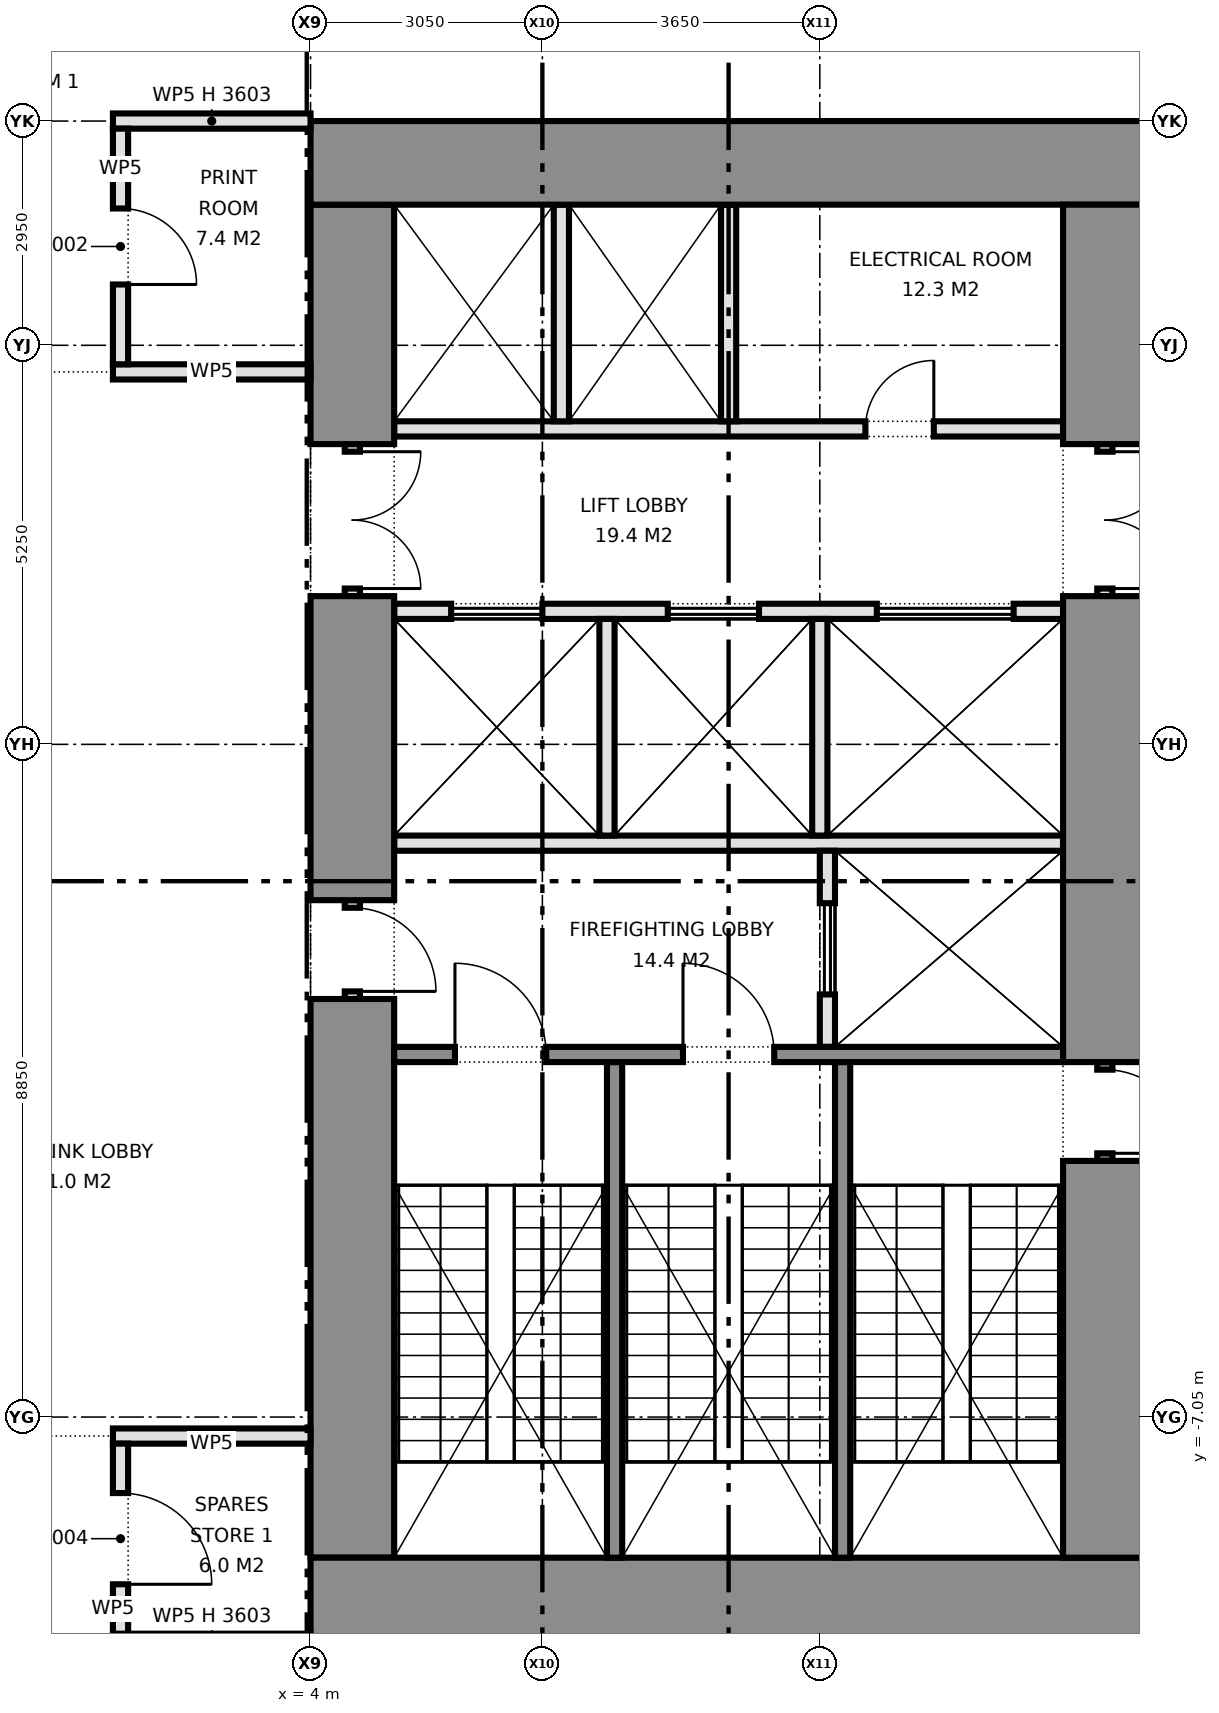
"""IFC4 building model, lengths in metres.
Left out: names, types, materials, properties, quantities, classifications, styles, units other than length and angle.
Written with IfcOpenShell. Run it as: python <this file> out.ifc"""

import sys

from ifc_helpers import new_model, si_unit, direction, frame, frame_2d, origin, place, context, subcontext, project, spatial, rectangle, extrude, element, fill, save


model = new_model("IFC4")
c1 = context("Model", 3, precision=1e-05, world=origin(), true_north=direction((0.0, 1.0)))
c2 = subcontext(c1, "Body", "Model", "MODEL_VIEW")
j1 = project(units=[si_unit("LENGTHUNIT", "METRE"), si_unit("PLANEANGLEUNIT", "RADIAN")], contexts=[c1])
p1 = place(None, origin())
s1 = spatial("IfcSite", under=j1, at=p1, CompositionType="ELEMENT")
p2 = place(p1, origin())
s2 = spatial("IfcBuilding", under=s1, at=p2, CompositionType="ELEMENT")
p3 = place(p2, frame((0.0, 0.0, 59.3)))
s3 = spatial("IfcBuildingStorey", under=s2, at=p3, CompositionType="ELEMENT", Elevation=59.3)
for number, where, z_axis, x_axis in (
    (1, (15.0, 9.45, 0.0), (0.0, 0.0, 1.0), (-1.0, 0.0, 0.0)),
    (2, (15.0, -9.45, 0.0), (0.0, 0.0, 1.0), (-1.0, 0.0, 0.0)),
):
    element("IfcWall", number, at=place(p3, frame(where, z_axis=z_axis, x_axis=x_axis)), inside=s3, PredefinedType="SHEAR", context=c2, shape_type="SweptSolid", body=[
        extrude(rectangle(XDim=11.0, YDim=1.1, at=frame_2d((5.5, 0.0))), origin(), (0.0, 0.0, 1.0), 4.55),
    ])
p4 = place(p3, frame((14.45, 8.9, 0.0), z_axis=(0.0, 0.0, 1.0), x_axis=(0.0, -1.0, 0.0)))
e3 = element("IfcWall", 3, at=p4, inside=s3, PredefinedType="SHEAR", context=c2, shape_type="SweptSolid", body=[
    extrude(rectangle(XDim=3.15, YDim=1.1, at=frame_2d((1.575, 0.0))), origin(), (0.0, 0.0, 1.0), 4.55),
])
p5 = place(p3, frame((14.45, 5.75, 0.0), z_axis=(0.0, 0.0, 1.0), x_axis=(0.0, -1.0, 0.0)))
e4 = element("IfcWall", 4, at=p5, inside=s3, PredefinedType="PARTITIONING", context=c2, shape_type="SweptSolid", body=[
    extrude(rectangle(XDim=2.0, YDim=0.2, at=frame_2d((1.0, 0.0))), origin(), (0.0, 0.0, 1.0), 2.4),
])
p6 = place(p5, frame((0.1, 0.0, 0.0)))
e5 = element("IfcOpeningElement", 5, at=p6, cuts=e4, PredefinedType="OPENING", context=c2, shape_type="SweptSolid", body=[
    extrude(rectangle(XDim=1.8, YDim=2.1, at=frame_2d((0.9, 1.05))), frame((0.0, 0.11, 0.0), z_axis=(0.0, -1.0, 0.0), x_axis=(1.0, 0.0, 0.0)), (0.0, 0.0, 1.0), 0.22),
])
p7 = place(p3, frame((14.45, 3.75, 0.0), z_axis=(0.0, 0.0, 1.0), x_axis=(0.0, -1.0, 0.0)))
e6 = element("IfcWall", 6, at=p7, inside=s3, PredefinedType="SHEAR", context=c2, shape_type="SweptSolid", body=[
    extrude(rectangle(XDim=6.13, YDim=1.1, at=frame_2d((3.065, 0.0))), origin(), (0.0, 0.0, 1.0), 4.55),
])
p8 = place(p3, frame((14.45, -2.38, 0.0), z_axis=(0.0, 0.0, 1.0), x_axis=(0.0, -1.0, 0.0)))
e7 = element("IfcWall", 7, at=p8, inside=s3, PredefinedType="SHEAR", context=c2, shape_type="SweptSolid", body=[
    extrude(rectangle(XDim=1.3, YDim=0.2, at=frame_2d((0.65, 0.0))), origin(), (0.0, 0.0, 1.0), 2.4),
])
p9 = place(p8, frame((0.1, 0.0, 0.0)))
e8 = element("IfcOpeningElement", 8, at=p9, cuts=e7, PredefinedType="OPENING", context=c2, shape_type="SweptSolid", body=[
    extrude(rectangle(XDim=1.1, YDim=2.1, at=frame_2d((0.55, 1.05))), frame((0.0, 0.11, 0.0), z_axis=(0.0, -1.0, 0.0), x_axis=(1.0, 0.0, 0.0)), (0.0, 0.0, 1.0), 0.22),
])
p10 = place(p3, frame((14.45, -3.68, 0.0), z_axis=(0.0, 0.0, 1.0), x_axis=(0.0, -1.0, 0.0)))
e9 = element("IfcWall", 9, at=p10, inside=s3, PredefinedType="SHEAR", context=c2, shape_type="SweptSolid", body=[
    extrude(rectangle(XDim=5.22, YDim=1.1, at=frame_2d((2.61, 0.0))), origin(), (0.0, 0.0, 1.0), 4.55),
])
p11 = place(p3, frame((4.55, 8.9, 0.0), z_axis=(0.0, 0.0, 1.0), x_axis=(0.0, -1.0, 0.0)))
e10 = element("IfcWall", 10, at=p11, inside=s3, PredefinedType="SHEAR", context=c2, shape_type="SweptSolid", body=[
    extrude(rectangle(XDim=3.15, YDim=1.1, at=frame_2d((1.575, 0.0))), origin(), (0.0, 0.0, 1.0), 4.55),
])
p12 = place(p3, frame((4.55, 5.75, 0.0), z_axis=(0.0, 0.0, 1.0), x_axis=(0.0, -1.0, 0.0)))
e11 = element("IfcWall", 11, at=p12, inside=s3, PredefinedType="PARTITIONING", context=c2, shape_type="SweptSolid", body=[
    extrude(rectangle(XDim=2.0, YDim=0.2, at=frame_2d((1.0, 0.0))), origin(), (0.0, 0.0, 1.0), 2.4),
])
p13 = place(p12, frame((0.1, 0.0, 0.0)))
e12 = element("IfcOpeningElement", 12, at=p13, cuts=e11, PredefinedType="OPENING", context=c2, shape_type="SweptSolid", body=[
    extrude(rectangle(XDim=1.8, YDim=2.1, at=frame_2d((0.9, 1.05))), frame((0.0, 0.11, 0.0), z_axis=(0.0, -1.0, 0.0), x_axis=(1.0, 0.0, 0.0)), (0.0, 0.0, 1.0), 0.22),
])
p14 = place(p3, frame((4.55, 3.75, 0.0), z_axis=(0.0, 0.0, 1.0), x_axis=(0.0, -1.0, 0.0)))
e13 = element("IfcWall", 13, at=p14, inside=s3, PredefinedType="SHEAR", context=c2, shape_type="SweptSolid", body=[
    extrude(rectangle(XDim=4.0, YDim=1.1, at=frame_2d((2.0, 0.0))), origin(), (0.0, 0.0, 1.0), 4.55),
])
p15 = place(p3, frame((4.55, -0.25, 0.0), z_axis=(0.0, 0.0, 1.0), x_axis=(0.0, -1.0, 0.0)))
e14 = element("IfcWall", 14, at=p15, inside=s3, PredefinedType="PARTITIONING", context=c2, shape_type="SweptSolid", body=[
    extrude(rectangle(XDim=1.3, YDim=0.2, at=frame_2d((0.65, 0.0))), origin(), (0.0, 0.0, 1.0), 2.4),
])
p16 = place(p15, frame((0.1, 0.0, 0.0)))
e15 = element("IfcOpeningElement", 15, at=p16, cuts=e14, PredefinedType="OPENING", context=c2, shape_type="SweptSolid", body=[
    extrude(rectangle(XDim=1.1, YDim=2.1, at=frame_2d((0.55, 1.05))), frame((0.0, 0.11, 0.0), z_axis=(0.0, -1.0, 0.0), x_axis=(1.0, 0.0, 0.0)), (0.0, 0.0, 1.0), 0.22),
])
p17 = place(p3, frame((4.55, -1.55, 0.0), z_axis=(0.0, 0.0, 1.0), x_axis=(0.0, -1.0, 0.0)))
e16 = element("IfcWall", 16, at=p17, inside=s3, PredefinedType="SHEAR", context=c2, shape_type="SweptSolid", body=[
    extrude(rectangle(XDim=7.35, YDim=1.1, at=frame_2d((3.675, 0.0))), origin(), (0.0, 0.0, 1.0), 4.55),
])
p18 = place(p3, frame((13.9, 5.95, 0.0), z_axis=(0.0, 0.0, 1.0), x_axis=(-1.0, 0.0, 0.0)))
e17 = element("IfcWall", 17, at=p18, inside=s3, PredefinedType="PARTITIONING", context=c2, shape_type="SweptSolid", body=[
    extrude(rectangle(XDim=8.8, YDim=0.2, at=frame_2d((4.4, 0.0))), origin(), (0.0, 0.0, 1.0), 4.55),
])
p19 = place(p18, frame((1.7, 0.0, 0.0)))
e18 = element("IfcOpeningElement", 18, at=p19, cuts=e17, PredefinedType="OPENING", context=c2, shape_type="SweptSolid", body=[
    extrude(rectangle(XDim=0.9, YDim=2.1, at=frame_2d((0.45, 1.05))), frame((0.0, 0.11, 0.0), z_axis=(0.0, -1.0, 0.0), x_axis=(1.0, 0.0, 0.0)), (0.0, 0.0, 1.0), 0.22),
])
p20 = place(p3, frame((13.9, 3.55, 0.0), z_axis=(0.0, 0.0, 1.0), x_axis=(-1.0, 0.0, 0.0)))
e19 = element("IfcWall", 19, at=p20, inside=s3, PredefinedType="PARTITIONING", context=c2, shape_type="SweptSolid", body=[
    extrude(rectangle(XDim=8.8, YDim=0.2, at=frame_2d((4.4, 0.0))), origin(), (0.0, 0.0, 1.0), 4.55),
])
p21 = place(p20, frame((0.65, 0.0, 0.0)))
e20 = element("IfcOpeningElement", 20, at=p21, cuts=e19, PredefinedType="OPENING", context=c2, shape_type="SweptSolid", body=[
    extrude(rectangle(XDim=1.8, YDim=2.1, at=frame_2d((0.9, 1.05))), frame((0.0, 0.11, 0.0), z_axis=(0.0, -1.0, 0.0), x_axis=(1.0, 0.0, 0.0)), (0.0, 0.0, 1.0), 0.22),
])
p22 = place(p20, frame((4.0, 0.0, 0.0)))
e21 = element("IfcOpeningElement", 21, at=p22, cuts=e19, PredefinedType="OPENING", context=c2, shape_type="SweptSolid", body=[
    extrude(rectangle(XDim=1.2, YDim=2.1, at=frame_2d((0.6, 1.05))), frame((0.0, 0.11, 0.0), z_axis=(0.0, -1.0, 0.0), x_axis=(1.0, 0.0, 0.0)), (0.0, 0.0, 1.0), 0.22),
])
p23 = place(p20, frame((6.85, 0.0, 0.0)))
e22 = element("IfcOpeningElement", 22, at=p23, cuts=e19, PredefinedType="OPENING", context=c2, shape_type="SweptSolid", body=[
    extrude(rectangle(XDim=1.2, YDim=2.1, at=frame_2d((0.6, 1.05))), frame((0.0, 0.11, 0.0), z_axis=(0.0, -1.0, 0.0), x_axis=(1.0, 0.0, 0.0)), (0.0, 0.0, 1.0), 0.22),
])
p24 = place(p3, frame((13.9, 0.5, 0.0), z_axis=(0.0, 0.0, 1.0), x_axis=(-1.0, 0.0, 0.0)))
e23 = element("IfcWall", 23, at=p24, inside=s3, PredefinedType="PARTITIONING", context=c2, shape_type="SweptSolid", body=[
    extrude(rectangle(XDim=8.8, YDim=0.2, at=frame_2d((4.4, 0.0))), origin(), (0.0, 0.0, 1.0), 4.55),
])
p25 = place(p3, frame((10.8, 0.4, 0.0), z_axis=(0.0, 0.0, 1.0), x_axis=(0.0, -1.0, 0.0)))
e24 = element("IfcWall", 24, at=p25, inside=s3, PredefinedType="PARTITIONING", context=c2, shape_type="SweptSolid", body=[
    extrude(rectangle(XDim=2.58, YDim=0.2, at=frame_2d((1.29, 0.0))), origin(), (0.0, 0.0, 1.0), 4.55),
])
p26 = place(p25, frame((0.69, 0.0, 0.0)))
e25 = element("IfcOpeningElement", 25, at=p26, cuts=e24, PredefinedType="OPENING", context=c2, shape_type="SweptSolid", body=[
    extrude(rectangle(XDim=1.2, YDim=2.1, at=frame_2d((0.6, 1.05))), frame((0.0, 0.11, 0.0), z_axis=(0.0, -1.0, 0.0), x_axis=(1.0, 0.0, 0.0)), (0.0, 0.0, 1.0), 0.22),
])
p27 = place(p3, frame((13.9, -2.28, 0.0), z_axis=(0.0, 0.0, 1.0), x_axis=(-1.0, 0.0, 0.0)))
e26 = element("IfcWall", 26, at=p27, inside=s3, PredefinedType="SHEAR", context=c2, shape_type="SweptSolid", body=[
    extrude(rectangle(XDim=8.8, YDim=0.2, at=frame_2d((4.4, 0.0))), origin(), (0.0, 0.0, 1.0), 4.55),
])
p28 = place(p27, frame((3.8, 0.0, 0.0)))
e27 = element("IfcOpeningElement", 27, at=p28, cuts=e26, PredefinedType="OPENING", context=c2, shape_type="SweptSolid", body=[
    extrude(rectangle(XDim=1.2, YDim=2.1, at=frame_2d((0.6, 1.05))), frame((0.0, 0.11, 0.0), z_axis=(0.0, -1.0, 0.0), x_axis=(1.0, 0.0, 0.0)), (0.0, 0.0, 1.0), 0.22),
])
p29 = place(p27, frame((6.8, 0.0, 0.0)))
e28 = element("IfcOpeningElement", 28, at=p29, cuts=e26, PredefinedType="OPENING", context=c2, shape_type="SweptSolid", body=[
    extrude(rectangle(XDim=1.2, YDim=2.1, at=frame_2d((0.6, 1.05))), frame((0.0, 0.11, 0.0), z_axis=(0.0, -1.0, 0.0), x_axis=(1.0, 0.0, 0.0)), (0.0, 0.0, 1.0), 0.22),
])
for number, where, z_axis, x_axis in (
    (29, (11.0, -2.38, 0.0), (0.0, 0.0, 1.0), (0.0, -1.0, 0.0)),
    (30, (8.0, -2.38, 0.0), (0.0, 0.0, 1.0), (0.0, -1.0, 0.0)),
):
    element("IfcWall", number, at=place(p3, frame(where, z_axis=z_axis, x_axis=x_axis)), inside=s3, PredefinedType="SHEAR", context=c2, shape_type="SweptSolid", body=[
        extrude(rectangle(XDim=6.52, YDim=0.2, at=frame_2d((3.26, 0.0))), origin(), (0.0, 0.0, 1.0), 4.55),
    ])
for number, where, z_axis, x_axis in (
    (31, (9.5, 8.9, 0.0), (0.0, 0.0, 1.0), (0.0, -1.0, 0.0)),
    (32, (7.3, 8.9, 0.0), (0.0, 0.0, 1.0), (0.0, -1.0, 0.0)),
    (33, (10.7, 3.45, 0.0), (0.0, 0.0, 1.0), (0.0, -1.0, 0.0)),
    (34, (7.9, 3.45, 0.0), (0.0, 0.0, 1.0), (0.0, -1.0, 0.0)),
):
    element("IfcWall", number, at=place(p3, frame(where, z_axis=z_axis, x_axis=x_axis)), inside=s3, PredefinedType="PARTITIONING", context=c2, shape_type="SweptSolid", body=[
        extrude(rectangle(XDim=2.85, YDim=0.2, at=frame_2d((1.425, 0.0))), origin(), (0.0, 0.0, 1.0), 4.55),
    ])
for number, where, z_axis, x_axis in (
    (35, (1.4, -7.3, 0.0), (0.0, 0.0, 1.0), (1.0, 0.0, 0.0)),
    (36, (1.4, 6.7, 0.0), (0.0, 0.0, 1.0), (1.0, 0.0, 0.0)),
):
    element("IfcWall", number, at=place(p3, frame(where, z_axis=z_axis, x_axis=x_axis)), inside=s3, PredefinedType="PARTITIONING", context=c2, shape_type="SweptSolid", body=[
        extrude(rectangle(XDim=2.6, YDim=0.2, at=frame_2d((1.3, 0.0))), origin(), (0.0, 0.0, 1.0), 4.55),
    ])
p30 = place(p3, frame((1.4, 10.0, 0.0), z_axis=(0.0, 0.0, 1.0), x_axis=(1.0, 0.0, 0.0)))
e37 = element("IfcWall", 37, at=p30, inside=s3, PredefinedType="PARTITIONING", context=c2, shape_type="SweptSolid", body=[
    extrude(rectangle(XDim=2.6, YDim=0.2, at=frame_2d((1.3, 0.0))), origin(), (0.0, 0.0, 1.0), 3.603),
])
p31 = place(p3, frame((1.5, -9.9, 0.0), z_axis=(0.0, 0.0, 1.0), x_axis=(0.0, 1.0, 0.0)))
e38 = element("IfcWall", 38, at=p31, inside=s3, PredefinedType="PARTITIONING", context=c2, shape_type="SweptSolid", body=[
    extrude(rectangle(XDim=2.5, YDim=0.2, at=frame_2d((1.25, 0.0))), origin(), (0.0, 0.0, 1.0), 4.55),
])
p32 = place(p31, frame((0.65, 0.0, 0.0)))
e39 = element("IfcOpeningElement", 39, at=p32, cuts=e38, PredefinedType="OPENING", context=c2, shape_type="SweptSolid", body=[
    extrude(rectangle(XDim=1.2, YDim=2.1, at=frame_2d((0.6, 1.05))), frame((0.0, 0.11, 0.0), z_axis=(0.0, -1.0, 0.0), x_axis=(1.0, 0.0, 0.0)), (0.0, 0.0, 1.0), 0.22),
])
p33 = place(p3, frame((1.5, 6.8, 0.0), z_axis=(0.0, 0.0, 1.0), x_axis=(0.0, 1.0, 0.0)))
e40 = element("IfcWall", 40, at=p33, inside=s3, PredefinedType="PARTITIONING", context=c2, shape_type="SweptSolid", body=[
    extrude(rectangle(XDim=3.1, YDim=0.2, at=frame_2d((1.55, 0.0))), origin(), (0.0, 0.0, 1.0), 4.55),
])
p34 = place(p33, frame((1.05, 0.0, 0.0)))
e41 = element("IfcOpeningElement", 41, at=p34, cuts=e40, PredefinedType="OPENING", context=c2, shape_type="SweptSolid", body=[
    extrude(rectangle(XDim=1.0, YDim=2.1, at=frame_2d((0.5, 1.05))), frame((0.0, 0.11, 0.0), z_axis=(0.0, -1.0, 0.0), x_axis=(1.0, 0.0, 0.0)), (0.0, 0.0, 1.0), 0.22),
])
p35 = place(p6, origin())
e42 = element("IfcDoor", 42, at=p35, inside=s3, OperationType="DOUBLE_DOOR_SINGLE_SWING", PredefinedType="DOOR", context=c2, shape_type="SweptSolid", body=[
    extrude(rectangle(XDim=1.8, YDim=2.1, at=frame_2d((0.9, 1.05))), frame((0.0, 0.025, 0.0), z_axis=(0.0, -1.0, 0.0), x_axis=(1.0, 0.0, 0.0)), (0.0, 0.0, 1.0), 0.05),
])
fill(e5, e42)
p36 = place(p9, origin())
e43 = element("IfcDoor", 43, at=p36, inside=s3, OperationType="SINGLE_SWING_RIGHT", PredefinedType="DOOR", context=c2, shape_type="SweptSolid", body=[
    extrude(rectangle(XDim=1.1, YDim=2.1, at=frame_2d((0.55, 1.05))), frame((0.0, 0.025, 0.0), z_axis=(0.0, -1.0, 0.0), x_axis=(1.0, 0.0, 0.0)), (0.0, 0.0, 1.0), 0.05),
])
fill(e8, e43)
p37 = place(p13, origin())
e44 = element("IfcDoor", 44, at=p37, inside=s3, OperationType="DOUBLE_DOOR_SINGLE_SWING", PredefinedType="DOOR", context=c2, shape_type="SweptSolid", body=[
    extrude(rectangle(XDim=1.8, YDim=2.1, at=frame_2d((0.9, 1.05))), frame((0.0, 0.025, 0.0), z_axis=(0.0, -1.0, 0.0), x_axis=(1.0, 0.0, 0.0)), (0.0, 0.0, 1.0), 0.05),
])
fill(e12, e44)
p38 = place(p16, origin())
e45 = element("IfcDoor", 45, at=p38, inside=s3, OperationType="SINGLE_SWING_RIGHT", PredefinedType="DOOR", context=c2, shape_type="SweptSolid", body=[
    extrude(rectangle(XDim=1.1, YDim=2.1, at=frame_2d((0.55, 1.05))), frame((0.0, 0.025, 0.0), z_axis=(0.0, -1.0, 0.0), x_axis=(1.0, 0.0, 0.0)), (0.0, 0.0, 1.0), 0.05),
])
fill(e15, e45)
p39 = place(p21, origin())
e46 = element("IfcDoor", 46, at=p39, inside=s3, OperationType="DOUBLE_DOOR_SLIDING", PredefinedType="DOOR", context=c2, shape_type="SweptSolid", body=[
    extrude(rectangle(XDim=1.8, YDim=2.1, at=frame_2d((0.9, 1.05))), frame((0.0, 0.025, 0.0), z_axis=(0.0, -1.0, 0.0), x_axis=(1.0, 0.0, 0.0)), (0.0, 0.0, 1.0), 0.05),
])
fill(e20, e46)
p40 = place(p22, origin())
e47 = element("IfcDoor", 47, at=p40, inside=s3, OperationType="DOUBLE_DOOR_SLIDING", PredefinedType="DOOR", context=c2, shape_type="SweptSolid", body=[
    extrude(rectangle(XDim=1.2, YDim=2.1, at=frame_2d((0.6, 1.05))), frame((0.0, 0.025, 0.0), z_axis=(0.0, -1.0, 0.0), x_axis=(1.0, 0.0, 0.0)), (0.0, 0.0, 1.0), 0.05),
])
fill(e21, e47)
p41 = place(p23, origin())
e48 = element("IfcDoor", 48, at=p41, inside=s3, OperationType="DOUBLE_DOOR_SLIDING", PredefinedType="DOOR", context=c2, shape_type="SweptSolid", body=[
    extrude(rectangle(XDim=1.2, YDim=2.1, at=frame_2d((0.6, 1.05))), frame((0.0, 0.025, 0.0), z_axis=(0.0, -1.0, 0.0), x_axis=(1.0, 0.0, 0.0)), (0.0, 0.0, 1.0), 0.05),
])
fill(e22, e48)
p42 = place(p26, origin())
e49 = element("IfcDoor", 49, at=p42, inside=s3, OperationType="DOUBLE_DOOR_SLIDING", PredefinedType="DOOR", context=c2, shape_type="SweptSolid", body=[
    extrude(rectangle(XDim=1.2, YDim=2.1, at=frame_2d((0.6, 1.05))), frame((0.0, 0.025, 0.0), z_axis=(0.0, -1.0, 0.0), x_axis=(1.0, 0.0, 0.0)), (0.0, 0.0, 1.0), 0.05),
])
fill(e25, e49)
p43 = place(p19, frame((0.9, 0.0, 0.0), z_axis=(0.0, 0.0, 1.0), x_axis=(-1.0, 0.0, 0.0)))
e50 = element("IfcDoor", 50, at=p43, inside=s3, OperationType="SINGLE_SWING_RIGHT", PredefinedType="DOOR", context=c2, shape_type="SweptSolid", body=[
    extrude(rectangle(XDim=0.9, YDim=2.1, at=frame_2d((0.45, 1.05))), frame((0.0, 0.025, 0.0), z_axis=(0.0, -1.0, 0.0), x_axis=(1.0, 0.0, 0.0)), (0.0, 0.0, 1.0), 0.05),
])
fill(e18, e50)
p44 = place(p28, frame((1.2, 0.0, 0.0), z_axis=(0.0, 0.0, 1.0), x_axis=(-1.0, 0.0, 0.0)))
e51 = element("IfcDoor", 51, at=p44, inside=s3, OperationType="SINGLE_SWING_LEFT", PredefinedType="DOOR", context=c2, shape_type="SweptSolid", body=[
    extrude(rectangle(XDim=1.2, YDim=2.1, at=frame_2d((0.6, 1.05))), frame((0.0, 0.025, 0.0), z_axis=(0.0, -1.0, 0.0), x_axis=(1.0, 0.0, 0.0)), (0.0, 0.0, 1.0), 0.05),
])
fill(e27, e51)
p45 = place(p29, frame((1.2, 0.0, 0.0), z_axis=(0.0, 0.0, 1.0), x_axis=(-1.0, 0.0, 0.0)))
e52 = element("IfcDoor", 52, at=p45, inside=s3, OperationType="SINGLE_SWING_LEFT", PredefinedType="DOOR", context=c2, shape_type="SweptSolid", body=[
    extrude(rectangle(XDim=1.2, YDim=2.1, at=frame_2d((0.6, 1.05))), frame((0.0, 0.025, 0.0), z_axis=(0.0, -1.0, 0.0), x_axis=(1.0, 0.0, 0.0)), (0.0, 0.0, 1.0), 0.05),
])
fill(e28, e52)
p46 = place(p34, frame((1.0, 0.0, 0.0), z_axis=(0.0, 0.0, 1.0), x_axis=(-1.0, 0.0, 0.0)))
e53 = element("IfcDoor", 53, at=p46, inside=s3, OperationType="SINGLE_SWING_RIGHT", PredefinedType="DOOR", context=c2, shape_type="SweptSolid", body=[
    extrude(rectangle(XDim=1.0, YDim=2.1, at=frame_2d((0.5, 1.05))), frame((0.0, 0.025, 0.0), z_axis=(0.0, -1.0, 0.0), x_axis=(1.0, 0.0, 0.0)), (0.0, 0.0, 1.0), 0.05),
])
fill(e41, e53)
p47 = place(p32, frame((1.2, 0.0, 0.0), z_axis=(0.0, 0.0, 1.0), x_axis=(-1.0, 0.0, 0.0)))
e54 = element("IfcDoor", 54, at=p47, inside=s3, OperationType="SINGLE_SWING_RIGHT", PredefinedType="DOOR", context=c2, shape_type="SweptSolid", body=[
    extrude(rectangle(XDim=1.2, YDim=2.1, at=frame_2d((0.6, 1.05))), frame((0.0, 0.025, 0.0), z_axis=(0.0, -1.0, 0.0), x_axis=(1.0, 0.0, 0.0)), (0.0, 0.0, 1.0), 0.05),
])
fill(e39, e54)
save(model, sys.argv[1])
